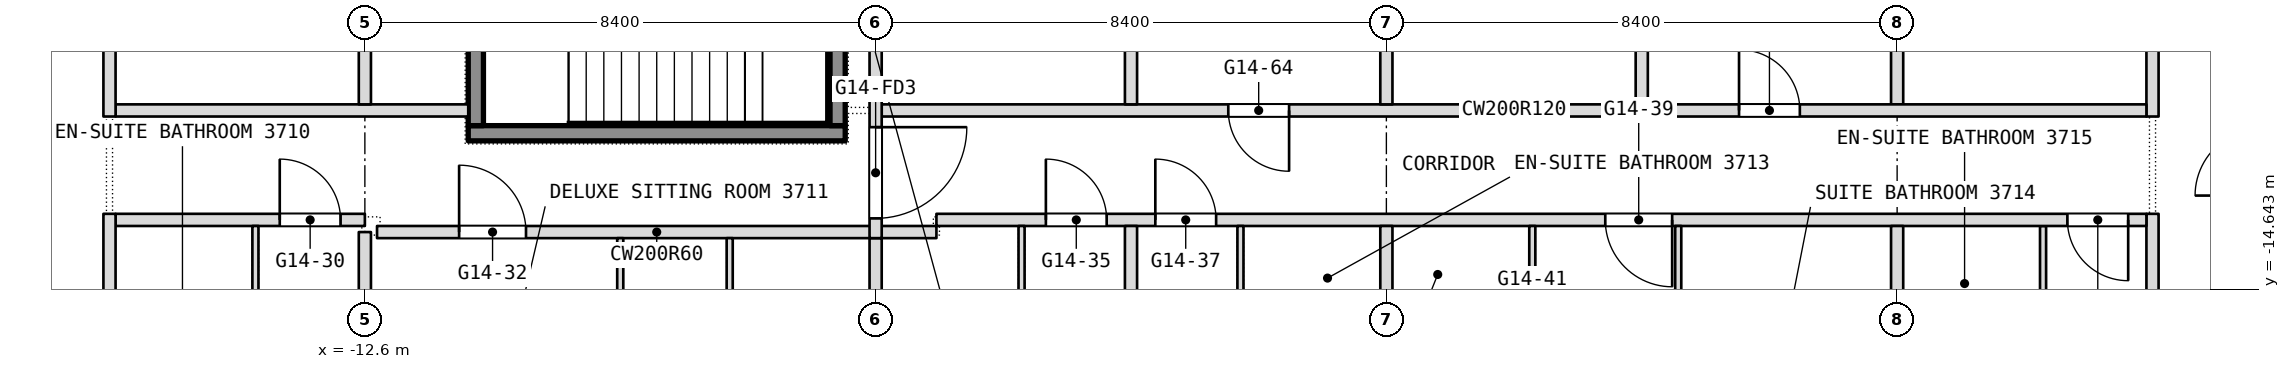
"""IFC4 building model, lengths in metres.
Left out: names, types, materials, properties, quantities, classifications, styles, units other than length and angle.
Written with IfcOpenShell. Run it as: python <this file> out.ifc"""

import sys

from ifc_helpers import new_model, si_unit, direction, frame, frame_2d, origin, place, context, subcontext, project, spatial, rectangle, extrude, element, fill, save


model = new_model("IFC4")
c1 = context("Model", 3, precision=1e-05, world=origin(), true_north=direction((0.0, 1.0)))
c2 = subcontext(c1, "Body", "Model", "MODEL_VIEW")
j1 = project(units=[si_unit("LENGTHUNIT", "METRE"), si_unit("PLANEANGLEUNIT", "RADIAN")], contexts=[c1])
p1 = place(None, origin())
s1 = spatial("IfcSite", under=j1, at=p1, CompositionType="ELEMENT")
p2 = place(p1, origin())
s2 = spatial("IfcBuilding", under=s1, at=p2, CompositionType="ELEMENT")
p3 = place(p2, frame((0.0, 0.0, 158.9)))
s3 = spatial("IfcBuildingStorey", under=s2, at=p3, CompositionType="ELEMENT", Elevation=158.9)
p4 = place(p3, frame((16.8, -22.186, 0.0), z_axis=(0.0, 0.0, 1.0), x_axis=(0.0, 1.0, 0.0)))
e1 = element("IfcWall", 1, at=p4, inside=s3, PredefinedType="PARTITIONING", context=c2, shape_type="SweptSolid", body=[
    extrude(rectangle(XDim=8.786, YDim=0.2, at=frame_2d((4.393, 0.0))), origin(), (0.0, 0.0, 1.0), 3.34),
])
p5 = place(p3, frame((16.8, -11.8, 0.0), z_axis=(0.0, 0.0, 1.0), x_axis=(0.0, 1.0, 0.0)))
e2 = element("IfcWall", 2, at=p5, inside=s3, PredefinedType="PARTITIONING", context=c2, shape_type="SweptSolid", body=[
    extrude(rectangle(XDim=9.9, YDim=0.2, at=frame_2d((4.95, 0.0))), origin(), (0.0, 0.0, 1.0), 3.34),
])
p6 = place(p3, frame((15.0, -16.45, 0.0), z_axis=(0.0, 0.0, 1.0), x_axis=(0.0, 1.0, 0.0)))
e3 = element("IfcWall", 3, at=p6, inside=s3, PredefinedType="PARTITIONING", context=c2, shape_type="SweptSolid", body=[
    extrude(rectangle(XDim=2.85, YDim=0.1, at=frame_2d((1.425, 0.0))), origin(), (0.0, 0.0, 1.0), 3.34),
])
p7 = place(p3, frame((-12.4, -13.7, 0.0), z_axis=(0.0, 0.0, 1.0), x_axis=(1.0, 0.0, 0.0)))
e4 = element("IfcWall", 4, at=p7, inside=s3, PredefinedType="PARTITIONING", context=c2, shape_type="SweptSolid", body=[
    extrude(rectangle(XDim=9.2, YDim=0.2, at=frame_2d((4.6, 0.0))), origin(), (0.0, 0.0, 1.0), 3.34),
])
p8 = place(p7, frame((1.35, 0.0, 0.0)))
e5 = element("IfcOpeningElement", 5, at=p8, cuts=e4, PredefinedType="OPENING", context=c2, shape_type="SweptSolid", body=[
    extrude(rectangle(XDim=1.1, YDim=2.1, at=frame_2d((0.55, 1.05))), frame((0.0, 0.1, 0.0), z_axis=(0.0, -1.0, 0.0), x_axis=(1.0, 0.0, 0.0)), (0.0, 0.0, 1.0), 0.2),
])
p9 = place(p3, frame((-16.7, -13.5, 0.0), z_axis=(0.0, 0.0, 1.0), x_axis=(1.0, 0.0, 0.0)))
e6 = element("IfcWall", 6, at=p9, inside=s3, PredefinedType="PARTITIONING", context=c2, shape_type="SweptSolid", body=[
    extrude(rectangle(XDim=4.1, YDim=0.2, at=frame_2d((2.05, 0.0))), origin(), (0.0, 0.0, 1.0), 3.34),
])
p10 = place(p9, frame((2.7, 0.0, 0.0)))
e7 = element("IfcOpeningElement", 7, at=p10, cuts=e6, PredefinedType="OPENING", context=c2, shape_type="SweptSolid", body=[
    extrude(rectangle(XDim=1.0, YDim=2.1, at=frame_2d((0.5, 1.05))), frame((0.0, 0.1, 0.0), z_axis=(0.0, -1.0, 0.0), x_axis=(1.0, 0.0, 0.0)), (0.0, 0.0, 1.0), 0.2),
])
p11 = place(p3, frame((-3.2, -13.5, 0.0), z_axis=(0.0, 0.0, 1.0), x_axis=(1.0, 0.0, 0.0)))
e8 = element("IfcWall", 8, at=p11, inside=s3, PredefinedType="PARTITIONING", context=c2, shape_type="SweptSolid", body=[
    extrude(rectangle(XDim=19.9, YDim=0.2, at=frame_2d((9.95, 0.0))), origin(), (0.0, 0.0, 1.0), 3.34),
])
p12 = place(p11, frame((1.8, 0.0, 0.0)))
e9 = element("IfcOpeningElement", 9, at=p12, cuts=e8, PredefinedType="OPENING", context=c2, shape_type="SweptSolid", body=[
    extrude(rectangle(XDim=1.0, YDim=2.1, at=frame_2d((0.5, 1.05))), frame((0.0, 0.1, 0.0), z_axis=(0.0, -1.0, 0.0), x_axis=(1.0, 0.0, 0.0)), (0.0, 0.0, 1.0), 0.2),
])
p13 = place(p11, frame((3.6, 0.0, 0.0)))
e10 = element("IfcOpeningElement", 10, at=p13, cuts=e8, PredefinedType="OPENING", context=c2, shape_type="SweptSolid", body=[
    extrude(rectangle(XDim=1.0, YDim=2.1, at=frame_2d((0.5, 1.05))), frame((0.0, 0.1, 0.0), z_axis=(0.0, -1.0, 0.0), x_axis=(1.0, 0.0, 0.0)), (0.0, 0.0, 1.0), 0.2),
])
p14 = place(p11, frame((11.0, 0.0, 0.0)))
e11 = element("IfcOpeningElement", 11, at=p14, cuts=e8, PredefinedType="OPENING", context=c2, shape_type="SweptSolid", body=[
    extrude(rectangle(XDim=1.1, YDim=2.1, at=frame_2d((0.55, 1.05))), frame((0.0, 0.1, 0.0), z_axis=(0.0, -1.0, 0.0), x_axis=(1.0, 0.0, 0.0)), (0.0, 0.0, 1.0), 0.2),
])
p15 = place(p11, frame((18.6, 0.0, 0.0)))
e12 = element("IfcOpeningElement", 12, at=p15, cuts=e8, PredefinedType="OPENING", context=c2, shape_type="SweptSolid", body=[
    extrude(rectangle(XDim=1.0, YDim=2.1, at=frame_2d((0.5, 1.05))), frame((0.0, 0.1, 0.0), z_axis=(0.0, -1.0, 0.0), x_axis=(1.0, 0.0, 0.0)), (0.0, 0.0, 1.0), 0.2),
])
p16 = place(p3, frame((12.6, -21.175, 0.0), z_axis=(0.0, 0.0, 1.0), x_axis=(0.0, 1.0, 0.0)))
e13 = element("IfcWall", 13, at=p16, inside=s3, PredefinedType="PARTITIONING", context=c2, shape_type="SweptSolid", body=[
    extrude(rectangle(XDim=7.575, YDim=0.2, at=frame_2d((3.788, 0.0))), origin(), (0.0, 0.0, 1.0), 3.34),
])
p17 = place(p3, frame((12.6, -11.6, 0.0), z_axis=(0.0, 0.0, 1.0), x_axis=(0.0, 1.0, 0.0)))
e14 = element("IfcWall", 14, at=p17, inside=s3, PredefinedType="PARTITIONING", context=c2, shape_type="SweptSolid", body=[
    extrude(rectangle(XDim=3.9, YDim=0.2, at=frame_2d((1.95, 0.0))), origin(), (0.0, 0.0, 1.0), 3.34),
])
p18 = place(p3, frame((-16.7, -11.7, 0.0), z_axis=(0.0, 0.0, 1.0), x_axis=(1.0, 0.0, 0.0)))
e15 = element("IfcWall", 15, at=p18, inside=s3, PredefinedType="PARTITIONING", context=c2, shape_type="SweptSolid", body=[
    extrude(rectangle(XDim=5.8, YDim=0.2, at=frame_2d((2.9, 0.0))), origin(), (0.0, 0.0, 1.0), 3.34),
])
p19 = place(p3, frame((-4.1, -11.7, 0.0), z_axis=(0.0, 0.0, 1.0), x_axis=(1.0, 0.0, 0.0)))
e16 = element("IfcWall", 16, at=p19, inside=s3, PredefinedType="PARTITIONING", context=c2, shape_type="SweptSolid", body=[
    extrude(rectangle(XDim=20.8, YDim=0.2, at=frame_2d((10.4, 0.0))), origin(), (0.0, 0.0, 1.0), 3.34),
])
p20 = place(p19, frame((14.1, 0.0, 0.0)))
e17 = element("IfcOpeningElement", 17, at=p20, cuts=e16, PredefinedType="OPENING", context=c2, shape_type="SweptSolid", body=[
    extrude(rectangle(XDim=1.0, YDim=2.1, at=frame_2d((0.5, 1.05))), frame((0.0, 0.1, 0.0), z_axis=(0.0, -1.0, 0.0), x_axis=(1.0, 0.0, 0.0)), (0.0, 0.0, 1.0), 0.2),
])
p21 = place(p19, frame((5.7, 0.0, 0.0)))
e18 = element("IfcOpeningElement", 18, at=p21, cuts=e16, PredefinedType="OPENING", context=c2, shape_type="SweptSolid", body=[
    extrude(rectangle(XDim=1.0, YDim=2.1, at=frame_2d((0.5, 1.05))), frame((0.0, 0.1, 0.0), z_axis=(0.0, -1.0, 0.0), x_axis=(1.0, 0.0, 0.0)), (0.0, 0.0, 1.0), 0.2),
])
p22 = place(p3, frame((9.0, -18.05, 0.0), z_axis=(0.0, 0.0, 1.0), x_axis=(0.0, 1.0, 0.0)))
e19 = element("IfcWall", 19, at=p22, inside=s3, PredefinedType="PARTITIONING", context=c2, shape_type="SweptSolid", body=[
    extrude(rectangle(XDim=4.45, YDim=0.1, at=frame_2d((2.225, 0.0))), origin(), (0.0, 0.0, 1.0), 3.34),
])
p23 = place(p3, frame((8.4, -11.6, 0.0), z_axis=(0.0, 0.0, 1.0), x_axis=(0.0, 1.0, 0.0)))
e20 = element("IfcWall", 20, at=p23, inside=s3, PredefinedType="PARTITIONING", context=c2, shape_type="SweptSolid", body=[
    extrude(rectangle(XDim=3.8, YDim=0.2, at=frame_2d((1.9, 0.0))), origin(), (0.0, 0.0, 1.0), 3.34),
])
p24 = place(p3, frame((6.6, -17.05, 0.0), z_axis=(0.0, 0.0, 1.0), x_axis=(0.0, 1.0, 0.0)))
e21 = element("IfcWall", 21, at=p24, inside=s3, PredefinedType="PARTITIONING", context=c2, shape_type="SweptSolid", body=[
    extrude(rectangle(XDim=3.45, YDim=0.1, at=frame_2d((1.725, 0.0))), origin(), (0.0, 0.0, 1.0), 3.34),
])
p25 = place(p24, frame((1.12, 0.0, 0.0)))
e22 = element("IfcOpeningElement", 22, at=p25, cuts=e21, PredefinedType="OPENING", context=c2, shape_type="SweptSolid", body=[
    extrude(rectangle(XDim=0.9, YDim=2.1, at=frame_2d((0.45, 1.05))), frame((0.0, 0.05, 0.0), z_axis=(0.0, -1.0, 0.0), x_axis=(1.0, 0.0, 0.0)), (0.0, 0.0, 1.0), 0.1),
])
p26 = place(p3, frame((4.2, -23.3, 0.0), z_axis=(0.0, 0.0, 1.0), x_axis=(0.0, 1.0, 0.0)))
e23 = element("IfcWall", 23, at=p26, inside=s3, PredefinedType="PARTITIONING", context=c2, shape_type="SweptSolid", body=[
    extrude(rectangle(XDim=9.7, YDim=0.2, at=frame_2d((4.85, 0.0))), origin(), (0.0, 0.0, 1.0), 3.34),
])
p27 = place(p3, frame((4.2, -11.6, 0.0), z_axis=(0.0, 0.0, 1.0), x_axis=(0.0, 1.0, 0.0)))
e24 = element("IfcWall", 24, at=p27, inside=s3, PredefinedType="PARTITIONING", context=c2, shape_type="SweptSolid", body=[
    extrude(rectangle(XDim=9.7, YDim=0.2, at=frame_2d((4.85, 0.0))), origin(), (0.0, 0.0, 1.0), 3.34),
])
p28 = place(p3, frame((1.8, -16.35, 0.0), z_axis=(0.0, 0.0, 1.0), x_axis=(0.0, 1.0, 0.0)))
e25 = element("IfcWall", 25, at=p28, inside=s3, PredefinedType="PARTITIONING", context=c2, shape_type="SweptSolid", body=[
    extrude(rectangle(XDim=2.75, YDim=0.1, at=frame_2d((1.375, 0.0))), origin(), (0.0, 0.0, 1.0), 3.34),
])
p29 = place(p3, frame((0.0, -23.3, 0.0), z_axis=(0.0, 0.0, 1.0), x_axis=(0.0, 1.0, 0.0)))
e26 = element("IfcWall", 26, at=p29, inside=s3, PredefinedType="PARTITIONING", context=c2, shape_type="SweptSolid", body=[
    extrude(rectangle(XDim=9.7, YDim=0.2, at=frame_2d((4.85, 0.0))), origin(), (0.0, 0.0, 1.0), 3.34),
])
p30 = place(p3, frame((0.0, -11.6, 0.0), z_axis=(0.0, 0.0, 1.0), x_axis=(0.0, 1.0, 0.0)))
e27 = element("IfcWall", 27, at=p30, inside=s3, PredefinedType="PARTITIONING", context=c2, shape_type="SweptSolid", body=[
    extrude(rectangle(XDim=9.7, YDim=0.2, at=frame_2d((4.85, 0.0))), origin(), (0.0, 0.0, 1.0), 3.34),
])
p31 = place(p3, frame((-1.8, -17.35, 0.0), z_axis=(0.0, 0.0, 1.0), x_axis=(0.0, 1.0, 0.0)))
e28 = element("IfcWall", 28, at=p31, inside=s3, PredefinedType="PARTITIONING", context=c2, shape_type="SweptSolid", body=[
    extrude(rectangle(XDim=3.75, YDim=0.1, at=frame_2d((1.875, 0.0))), origin(), (0.0, 0.0, 1.0), 3.34),
])
p32 = place(p3, frame((-4.2, -23.3, 0.0), z_axis=(0.0, 0.0, 1.0), x_axis=(0.0, 1.0, 0.0)))
e29 = element("IfcWall", 29, at=p32, inside=s3, PredefinedType="PARTITIONING", context=c2, shape_type="SweptSolid", body=[
    extrude(rectangle(XDim=9.5, YDim=0.2, at=frame_2d((4.75, 0.0))), origin(), (0.0, 0.0, 1.0), 3.34),
])
p33 = place(p3, frame((-4.2, -13.8, 0.0), z_axis=(0.0, 0.0, 1.0), x_axis=(0.0, 1.0, 0.0)))
e30 = element("IfcWall", 30, at=p33, inside=s3, PredefinedType="PARTITIONING", context=c2, shape_type="SweptSolid", body=[
    extrude(rectangle(XDim=13.8, YDim=0.2, at=frame_2d((6.9, 0.0))), origin(), (0.0, 0.0, 1.0), 3.34),
])
p34 = place(p33, frame((12.15, 0.0, 0.0)))
e31 = element("IfcOpeningElement", 31, at=p34, cuts=e30, PredefinedType="OPENING", context=c2, shape_type="SweptSolid", body=[
    extrude(rectangle(XDim=1.5, YDim=2.1, at=frame_2d((0.75, 1.05))), frame((0.0, 0.1, 0.0), z_axis=(0.0, -1.0, 0.0), x_axis=(1.0, 0.0, 0.0)), (0.0, 0.0, 1.0), 0.2),
])
p35 = place(p33, frame((0.325, 0.0, 0.0)))
e32 = element("IfcOpeningElement", 32, at=p35, cuts=e30, PredefinedType="OPENING", context=c2, shape_type="SweptSolid", body=[
    extrude(rectangle(XDim=1.5, YDim=2.1, at=frame_2d((0.75, 1.05))), frame((0.0, 0.1, 0.0), z_axis=(0.0, -1.0, 0.0), x_axis=(1.0, 0.0, 0.0)), (0.0, 0.0, 1.0), 0.2),
])
p36 = place(p3, frame((-6.6, -17.35, 0.0), z_axis=(0.0, 0.0, 1.0), x_axis=(0.0, 1.0, 0.0)))
e33 = element("IfcWall", 33, at=p36, inside=s3, PredefinedType="PARTITIONING", context=c2, shape_type="SweptSolid", body=[
    extrude(rectangle(XDim=3.55, YDim=0.1, at=frame_2d((1.775, 0.0))), origin(), (0.0, 0.0, 1.0), 3.34),
])
p37 = place(p3, frame((-8.4, -23.3, 0.0), z_axis=(0.0, 0.0, 1.0), x_axis=(0.0, 1.0, 0.0)))
e34 = element("IfcWall", 34, at=p37, inside=s3, PredefinedType="PARTITIONING", context=c2, shape_type="SweptSolid", body=[
    extrude(rectangle(XDim=9.5, YDim=0.1, at=frame_2d((4.75, 0.0))), origin(), (0.0, 0.0, 1.0), 3.34),
])
p38 = place(p37, frame((3.57, 0.0, 0.0)))
e35 = element("IfcOpeningElement", 35, at=p38, cuts=e34, PredefinedType="OPENING", context=c2, shape_type="SweptSolid", body=[
    extrude(rectangle(XDim=0.9, YDim=2.1, at=frame_2d((0.45, 1.05))), frame((0.0, 0.05, 0.0), z_axis=(0.0, -1.0, 0.0), x_axis=(1.0, 0.0, 0.0)), (0.0, 0.0, 1.0), 0.1),
])
p39 = place(p3, frame((-12.6, -21.175, 0.0), z_axis=(0.0, 0.0, 1.0), x_axis=(0.0, 1.0, 0.0)))
e36 = element("IfcWall", 36, at=p39, inside=s3, PredefinedType="PARTITIONING", context=c2, shape_type="SweptSolid", body=[
    extrude(rectangle(XDim=7.475, YDim=0.2, at=frame_2d((3.738, 0.0))), origin(), (0.0, 0.0, 1.0), 3.34),
])
p40 = place(p3, frame((-12.6, -11.6, 0.0), z_axis=(0.0, 0.0, 1.0), x_axis=(0.0, 1.0, 0.0)))
e37 = element("IfcWall", 37, at=p40, inside=s3, PredefinedType="PARTITIONING", context=c2, shape_type="SweptSolid", body=[
    extrude(rectangle(XDim=9.7, YDim=0.2, at=frame_2d((4.85, 0.0))), origin(), (0.0, 0.0, 1.0), 3.34),
])
p41 = place(p3, frame((-14.4, -17.65, 0.0), z_axis=(0.0, 0.0, 1.0), x_axis=(0.0, 1.0, 0.0)))
e38 = element("IfcWall", 38, at=p41, inside=s3, PredefinedType="PARTITIONING", context=c2, shape_type="SweptSolid", body=[
    extrude(rectangle(XDim=4.05, YDim=0.1, at=frame_2d((2.025, 0.0))), origin(), (0.0, 0.0, 1.0), 3.34),
])
p42 = place(p3, frame((-16.8, -22.186, 0.0), z_axis=(0.0, 0.0, 1.0), x_axis=(0.0, 1.0, 0.0)))
e39 = element("IfcWall", 39, at=p42, inside=s3, PredefinedType="PARTITIONING", context=c2, shape_type="SweptSolid", body=[
    extrude(rectangle(XDim=8.786, YDim=0.2, at=frame_2d((4.393, 0.0))), origin(), (0.0, 0.0, 1.0), 3.34),
])
p43 = place(p3, frame((-16.8, -11.8, 0.0), z_axis=(0.0, 0.0, 1.0), x_axis=(0.0, 1.0, 0.0)))
e40 = element("IfcWall", 40, at=p43, inside=s3, PredefinedType="PARTITIONING", context=c2, shape_type="SweptSolid", body=[
    extrude(rectangle(XDim=9.9, YDim=0.2, at=frame_2d((4.95, 0.0))), origin(), (0.0, 0.0, 1.0), 3.34),
])
p44 = place(p3, frame((-10.9, -12.075, 0.1), z_axis=(0.0, 0.0, 1.0), x_axis=(1.0, 0.0, 0.0)))
e41 = element("IfcWall", 41, at=p44, inside=s3, PredefinedType="SHEAR", context=c2, shape_type="SweptSolid", body=[
    extrude(rectangle(XDim=6.2, YDim=0.25, at=frame_2d((3.1, 0.0))), origin(), (0.0, 0.0, 1.0), 3.6),
])
for number, where, z_axis, x_axis in (
    (42, (-10.775, -11.95, 0.1), (0.0, 0.0, 1.0), (0.0, 1.0, 0.0)),
    (43, (-4.825, -11.95, 0.1), (0.0, 0.0, 1.0), (0.0, 1.0, 0.0)),
):
    element("IfcWall", number, at=place(p3, frame(where, z_axis=z_axis, x_axis=x_axis)), inside=s3, PredefinedType="SHEAR", context=c2, shape_type="SweptSolid", body=[
        extrude(rectangle(XDim=2.9, YDim=0.25, at=frame_2d((1.45, 0.0))), origin(), (0.0, 0.0, 1.0), 3.6),
    ])
p45 = place(p8, origin())
e44 = element("IfcDoor", 44, at=p45, inside=s3, OperationType="SINGLE_SWING_RIGHT", PredefinedType="DOOR", context=c2, shape_type="SweptSolid", body=[
    extrude(rectangle(XDim=1.1, YDim=2.1, at=frame_2d((0.55, 1.05))), frame((0.0, 0.025, 0.0), z_axis=(0.0, -1.0, 0.0), x_axis=(1.0, 0.0, 0.0)), (0.0, 0.0, 1.0), 0.05),
])
fill(e5, e44)
p46 = place(p10, origin())
e45 = element("IfcDoor", 45, at=p46, inside=s3, OperationType="SINGLE_SWING_RIGHT", PredefinedType="DOOR", context=c2, shape_type="SweptSolid", body=[
    extrude(rectangle(XDim=1.0, YDim=2.1, at=frame_2d((0.5, 1.05))), frame((0.0, 0.025, 0.0), z_axis=(0.0, -1.0, 0.0), x_axis=(1.0, 0.0, 0.0)), (0.0, 0.0, 1.0), 0.05),
])
fill(e7, e45)
p47 = place(p12, origin())
e46 = element("IfcDoor", 46, at=p47, inside=s3, OperationType="SINGLE_SWING_LEFT", PredefinedType="DOOR", context=c2, shape_type="SweptSolid", body=[
    extrude(rectangle(XDim=1.0, YDim=2.1, at=frame_2d((0.5, 1.05))), frame((0.0, 0.025, 0.0), z_axis=(0.0, -1.0, 0.0), x_axis=(1.0, 0.0, 0.0)), (0.0, 0.0, 1.0), 0.05),
])
fill(e9, e46)
p48 = place(p13, origin())
e47 = element("IfcDoor", 47, at=p48, inside=s3, OperationType="SINGLE_SWING_LEFT", PredefinedType="DOOR", context=c2, shape_type="SweptSolid", body=[
    extrude(rectangle(XDim=1.0, YDim=2.1, at=frame_2d((0.5, 1.05))), frame((0.0, 0.025, 0.0), z_axis=(0.0, -1.0, 0.0), x_axis=(1.0, 0.0, 0.0)), (0.0, 0.0, 1.0), 0.05),
])
fill(e10, e47)
p49 = place(p14, origin())
e48 = element("IfcDoor", 48, at=p49, inside=s3, OperationType="SINGLE_SWING_LEFT", PredefinedType="DOOR", context=c2, shape_type="SweptSolid", body=[
    extrude(rectangle(XDim=1.1, YDim=2.1, at=frame_2d((0.55, 1.05))), frame((0.0, 0.025, 0.0), z_axis=(0.0, -1.0, 0.0), x_axis=(1.0, 0.0, 0.0)), (0.0, 0.0, 1.0), 0.05),
])
fill(e11, e48)
p50 = place(p15, origin())
e49 = element("IfcDoor", 49, at=p50, inside=s3, OperationType="SINGLE_SWING_LEFT", PredefinedType="DOOR", context=c2, shape_type="SweptSolid", body=[
    extrude(rectangle(XDim=1.0, YDim=2.1, at=frame_2d((0.5, 1.05))), frame((0.0, 0.025, 0.0), z_axis=(0.0, -1.0, 0.0), x_axis=(1.0, 0.0, 0.0)), (0.0, 0.0, 1.0), 0.05),
])
fill(e12, e49)
p51 = place(p20, origin())
e50 = element("IfcDoor", 50, at=p51, inside=s3, OperationType="SINGLE_SWING_RIGHT", PredefinedType="DOOR", context=c2, shape_type="SweptSolid", body=[
    extrude(rectangle(XDim=1.0, YDim=2.1, at=frame_2d((0.5, 1.05))), frame((0.0, 0.025, 0.0), z_axis=(0.0, -1.0, 0.0), x_axis=(1.0, 0.0, 0.0)), (0.0, 0.0, 1.0), 0.05),
])
fill(e17, e50)
p52 = place(p21, origin())
e51 = element("IfcDoor", 51, at=p52, inside=s3, OperationType="SINGLE_SWING_RIGHT", PredefinedType="DOOR", context=c2, shape_type="SweptSolid", body=[
    extrude(rectangle(XDim=1.0, YDim=2.1, at=frame_2d((0.5, 1.05))), frame((0.0, 0.025, 0.0), z_axis=(0.0, -1.0, 0.0), x_axis=(1.0, 0.0, 0.0)), (0.0, 0.0, 1.0), 0.05),
])
fill(e18, e51)
p53 = place(p35, origin())
e52 = element("IfcDoor", 52, at=p53, inside=s3, OperationType="DOUBLE_DOOR_DOUBLE_SWING", PredefinedType="DOOR", context=c2, shape_type="SweptSolid", body=[
    extrude(rectangle(XDim=1.5, YDim=2.1, at=frame_2d((0.75, 1.05))), frame((0.0, 0.025, 0.0), z_axis=(0.0, -1.0, 0.0), x_axis=(1.0, 0.0, 0.0)), (0.0, 0.0, 1.0), 0.05),
])
fill(e32, e52)
save(model, sys.argv[1])
